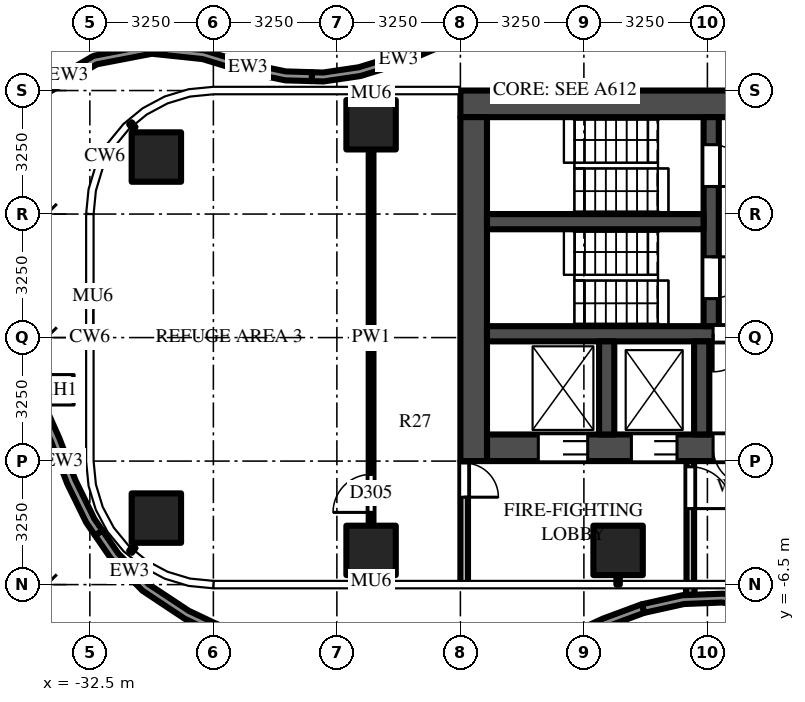
"""IFC4 building model, lengths in metres.
Left out: names, types, materials, properties, quantities, classifications, styles, units other than length and angle.
Written with IfcOpenShell. Run it as: python <this file> out.ifc"""

import sys

from ifc_helpers import new_model, si_unit, direction, frame, frame_2d, origin, origin_2d, place, context, subcontext, project, spatial, polyline, rectangle, outline, extrude, source, transform, mapped, element, fill, save


model = new_model("IFC4")
c1 = context("Model", 3, precision=1e-05, world=origin(), true_north=direction((0.0, 1.0)))
c2 = subcontext(c1, "Body", "Model", "MODEL_VIEW")
j1 = project(units=[si_unit("LENGTHUNIT", "METRE"), si_unit("PLANEANGLEUNIT", "RADIAN")], contexts=[c1])
p1 = place(None, origin())
s1 = spatial("IfcSite", under=j1, at=p1, CompositionType="ELEMENT")
p2 = place(p1, origin())
s2 = spatial("IfcBuilding", under=s1, at=p2, CompositionType="ELEMENT")
p3 = place(p2, frame((0.0, 0.0, 92.5)))
s3 = spatial("IfcBuildingStorey", under=s2, at=p3, CompositionType="ELEMENT", Elevation=92.5)
m1 = source(origin(), c2, "Body", "SweptSolid", [
    extrude(rectangle(XDim=1.3, YDim=1.3, at=origin_2d()), origin(), (0.0, 0.0, 1.0), 5.0),
])
for number, where, z_axis, x_axis in (
    (1, (-18.6, -5.6, 0.0), (0.0, 0.0, 1.0), (1.0, 0.0, 0.0)),
    (2, (-25.1, -5.6, 0.0), (0.0, 0.0, 1.0), (1.0, 0.0, 0.0)),
    (3, (-30.75, -4.75, 0.0), (0.0, 0.0, 1.0), (1.0, 0.0, 0.0)),
    (4, (-25.1, 5.6, 0.0), (0.0, 0.0, 1.0), (1.0, 0.0, 0.0)),
    (5, (-30.75, 4.75, 0.0), (0.0, 0.0, 1.0), (1.0, 0.0, 0.0)),
):
    element("IfcColumn", number, at=place(p3, frame(where, z_axis=z_axis, x_axis=x_axis)), inside=s3, PredefinedType="COLUMN", context=c2, shape_type="MappedRepresentation", body=[
        mapped(m1, transform((0.0, 0.0, 0.0))),
    ])
m2 = source(origin(), c2, "Body", "SweptSolid", [
    extrude(rectangle(XDim=16.5, YDim=0.7, at=frame_2d((8.25, 0.0))), origin(), (0.0, 0.0, 1.0), 4.75),
])
p4 = place(p3, frame((-6.25, 6.15, 0.0), z_axis=(0.0, 0.0, 1.0), x_axis=(-1.0, 0.0, 0.0)))
e6 = element("IfcWall", 6, at=p4, inside=s3, PredefinedType="SHEAR", context=c2, shape_type="MappedRepresentation", body=[
    mapped(m2, transform((0.0, 0.0, 0.0))),
])
m3 = source(origin(), c2, "Body", "SweptSolid", [
    extrude(rectangle(XDim=14.85, YDim=0.7, at=frame_2d((7.425, 0.0))), origin(), (0.0, 0.0, 1.0), 4.75),
])
p5 = place(p3, frame((-7.2, -2.9, 0.0), z_axis=(0.0, 0.0, 1.0), x_axis=(-1.0, 0.0, 0.0)))
e7 = element("IfcWall", 7, at=p5, inside=s3, PredefinedType="SHEAR", context=c2, shape_type="MappedRepresentation", body=[
    mapped(m3, transform((0.0, 0.0, 0.0))),
])
m4 = source(origin(), c2, "Body", "SweptSolid", [
    extrude(rectangle(XDim=1.3, YDim=2.1, at=frame_2d((0.65, 1.05))), frame((0.0, 0.36, 0.0), z_axis=(0.0, -1.0, 0.0), x_axis=(1.0, 0.0, 0.0)), (0.0, 0.0, 1.0), 0.72),
])
p6 = place(p5, frame((12.2, 0.0, 0.0)))
e8 = element("IfcOpeningElement", 8, at=p6, cuts=e7, PredefinedType="OPENING", context=c2, shape_type="MappedRepresentation", body=[
    mapped(m4, transform((0.0, 0.0, 0.0))),
])
m5 = source(origin(), c2, "Body", "SweptSolid", [
    extrude(rectangle(XDim=1.2, YDim=2.1, at=frame_2d((0.6, 1.05))), frame((0.0, 0.36, 0.0), z_axis=(0.0, -1.0, 0.0), x_axis=(1.0, 0.0, 0.0)), (0.0, 0.0, 1.0), 0.72),
])
p7 = place(p5, frame((9.85, 0.0, 0.0)))
e9 = element("IfcOpeningElement", 9, at=p7, cuts=e7, PredefinedType="OPENING", context=c2, shape_type="MappedRepresentation", body=[
    mapped(m5, transform((0.0, 0.0, 0.0))),
])
m6 = source(origin(), c2, "Body", "SweptSolid", [
    extrude(rectangle(XDim=1.0, YDim=2.1, at=frame_2d((0.5, 1.05))), frame((0.0, 0.36, 0.0), z_axis=(0.0, -1.0, 0.0), x_axis=(1.0, 0.0, 0.0)), (0.0, 0.0, 1.0), 0.72),
])
p8 = place(p5, frame((7.9, 0.0, 0.0)))
e10 = element("IfcOpeningElement", 10, at=p8, cuts=e7, PredefinedType="OPENING", context=c2, shape_type="MappedRepresentation", body=[
    mapped(m6, transform((0.0, 0.0, 0.0))),
])
m7 = source(origin(), c2, "Body", "SweptSolid", [
    extrude(rectangle(XDim=0.8, YDim=2.1, at=frame_2d((0.4, 1.05))), frame((0.0, 0.36, 0.0), z_axis=(0.0, -1.0, 0.0), x_axis=(1.0, 0.0, 0.0)), (0.0, 0.0, 1.0), 0.72),
])
p9 = place(p5, frame((0.113, 0.0, 0.0)))
e11 = element("IfcOpeningElement", 11, at=p9, cuts=e7, PredefinedType="OPENING", context=c2, shape_type="MappedRepresentation", body=[
    mapped(m7, transform((0.0, 0.0, 0.0))),
])
p10 = place(p5, frame((1.288, 0.0, 0.0)))
e12 = element("IfcOpeningElement", 12, at=p10, cuts=e7, PredefinedType="OPENING", context=c2, shape_type="MappedRepresentation", body=[
    mapped(m7, transform((0.0, 0.0, 0.0))),
])
p11 = place(p5, frame((2.712, 0.0, 0.0)))
e13 = element("IfcOpeningElement", 13, at=p11, cuts=e7, PredefinedType="OPENING", context=c2, shape_type="MappedRepresentation", body=[
    mapped(m7, transform((0.0, 0.0, 0.0))),
])
p12 = place(p5, frame((3.887, 0.0, 0.0)))
e14 = element("IfcOpeningElement", 14, at=p12, cuts=e7, PredefinedType="OPENING", context=c2, shape_type="MappedRepresentation", body=[
    mapped(m7, transform((0.0, 0.0, 0.0))),
])
p13 = place(p5, frame((5.312, 0.0, 0.0)))
e15 = element("IfcOpeningElement", 15, at=p13, cuts=e7, PredefinedType="OPENING", context=c2, shape_type="MappedRepresentation", body=[
    mapped(m7, transform((0.0, 0.0, 0.0))),
])
p14 = place(p5, frame((6.488, 0.0, 0.0)))
e16 = element("IfcOpeningElement", 16, at=p14, cuts=e7, PredefinedType="OPENING", context=c2, shape_type="MappedRepresentation", body=[
    mapped(m7, transform((0.0, 0.0, 0.0))),
])
m8 = source(origin(), c2, "Body", "SweptSolid", [
    extrude(rectangle(XDim=9.05, YDim=0.7, at=frame_2d((4.525, 0.0))), origin(), (0.0, 0.0, 1.0), 4.75),
])
p15 = place(p3, frame((-22.4, 5.8, 0.0), z_axis=(0.0, 0.0, 1.0), x_axis=(0.0, -1.0, 0.0)))
e17 = element("IfcWall", 17, at=p15, inside=s3, PredefinedType="SHEAR", context=c2, shape_type="MappedRepresentation", body=[
    mapped(m8, transform((0.0, 0.0, 0.0))),
])
m9 = source(origin(), c2, "Body", "SweptSolid", [
    extrude(rectangle(XDim=14.85, YDim=0.4, at=frame_2d((7.425, 0.0))), origin(), (0.0, 0.0, 1.0), 4.75),
])
p16 = place(p3, frame((-7.2, 0.1, 0.0), z_axis=(0.0, 0.0, 1.0), x_axis=(-1.0, 0.0, 0.0)))
e18 = element("IfcWall", 18, at=p16, inside=s3, PredefinedType="SHEAR", context=c2, shape_type="MappedRepresentation", body=[
    mapped(m9, transform((0.0, 0.0, 0.0))),
])
m10 = source(origin(), c2, "Body", "SweptSolid", [
    extrude(rectangle(XDim=1.0, YDim=2.1, at=frame_2d((0.5, 1.05))), frame((0.0, 0.21, 0.0), z_axis=(0.0, -1.0, 0.0), x_axis=(1.0, 0.0, 0.0)), (0.0, 0.0, 1.0), 0.42),
])
p17 = place(p16, frame((7.9, 0.0, 0.0)))
e19 = element("IfcOpeningElement", 19, at=p17, cuts=e18, PredefinedType="OPENING", context=c2, shape_type="MappedRepresentation", body=[
    mapped(m10, transform((0.0, 0.0, 0.0))),
])
m11 = source(origin(), c2, "Body", "SweptSolid", [
    extrude(rectangle(XDim=5.5, YDim=0.4, at=frame_2d((2.75, 0.0))), origin(), (0.0, 0.0, 1.0), 4.75),
])
p18 = place(p3, frame((-16.15, 5.8, 0.0), z_axis=(0.0, 0.0, 1.0), x_axis=(0.0, -1.0, 0.0)))
e20 = element("IfcWall", 20, at=p18, inside=s3, PredefinedType="SHEAR", context=c2, shape_type="MappedRepresentation", body=[
    mapped(m11, transform((0.0, 0.0, 0.0))),
])
m12 = source(origin(), c2, "Body", "SweptSolid", [
    extrude(rectangle(XDim=1.1, YDim=2.1, at=frame_2d((0.55, 1.05))), frame((0.0, 0.21, 0.0), z_axis=(0.0, -1.0, 0.0), x_axis=(1.0, 0.0, 0.0)), (0.0, 0.0, 1.0), 0.42),
])
p19 = place(p18, frame((0.725, 0.0, 0.0)))
e21 = element("IfcOpeningElement", 21, at=p19, cuts=e20, PredefinedType="OPENING", context=c2, shape_type="MappedRepresentation", body=[
    mapped(m12, transform((0.0, 0.0, 0.0))),
])
p20 = place(p18, frame((3.675, 0.0, 0.0)))
e22 = element("IfcOpeningElement", 22, at=p20, cuts=e20, PredefinedType="OPENING", context=c2, shape_type="MappedRepresentation", body=[
    mapped(m12, transform((0.0, 0.0, 0.0))),
])
m13 = source(origin(), c2, "Body", "SweptSolid", [
    extrude(rectangle(XDim=5.7, YDim=0.4, at=frame_2d((2.85, 0.0))), origin(), (0.0, 0.0, 1.0), 4.75),
])
p21 = place(p3, frame((-16.35, 3.05, 0.0), z_axis=(0.0, 0.0, 1.0), x_axis=(-1.0, 0.0, 0.0)))
e23 = element("IfcWall", 23, at=p21, inside=s3, PredefinedType="SHEAR", context=c2, shape_type="MappedRepresentation", body=[
    mapped(m13, transform((0.0, 0.0, 0.0))),
])
m14 = source(origin(), c2, "Body", "SweptSolid", [
    extrude(rectangle(XDim=2.45, YDim=0.4, at=frame_2d((1.225, 0.0))), origin(), (0.0, 0.0, 1.0), 4.75),
])
for number, where, z_axis, x_axis in (
    (24, (-16.4, -0.1, 0.0), (0.0, 0.0, 1.0), (0.0, -1.0, 0.0)),
    (25, (-18.9, -0.1, 0.0), (0.0, 0.0, 1.0), (0.0, -1.0, 0.0)),
):
    element("IfcWall", number, at=place(p3, frame(where, z_axis=z_axis, x_axis=x_axis)), inside=s3, PredefinedType="SHEAR", context=c2, shape_type="MappedRepresentation", body=[
        mapped(m14, transform((0.0, 0.0, 0.0))),
    ])
m15 = source(origin(), c2, "Body", "SweptSolid", [
    extrude(rectangle(XDim=3.25, YDim=0.2, at=frame_2d((1.625, 0.0))), origin(), (0.0, 0.0, 1.0), 4.75),
])
p22 = place(p3, frame((-16.7, -3.25, 0.0), z_axis=(0.0, 0.0, 1.0), x_axis=(0.0, -1.0, 0.0)))
e26 = element("IfcWall", 26, at=p22, inside=s3, PredefinedType="PARTITIONING", context=c2, shape_type="MappedRepresentation", body=[
    mapped(m15, transform((0.0, 0.0, 0.0))),
])
m16 = source(origin(), c2, "Body", "SweptSolid", [
    extrude(rectangle(XDim=1.1, YDim=2.1, at=frame_2d((0.55, 1.05))), frame((0.0, 0.11, 0.0), z_axis=(0.0, -1.0, 0.0), x_axis=(1.0, 0.0, 0.0)), (0.0, 0.0, 1.0), 0.22),
])
p23 = place(p22, frame((0.15, 0.0, 0.0)))
e27 = element("IfcOpeningElement", 27, at=p23, cuts=e26, PredefinedType="OPENING", context=c2, shape_type="MappedRepresentation", body=[
    mapped(m16, transform((0.0, 0.0, 0.0))),
])
p24 = place(p3, frame((-22.65, -3.25, 0.0), z_axis=(0.0, 0.0, 1.0), x_axis=(0.0, -1.0, 0.0)))
e28 = element("IfcWall", 28, at=p24, inside=s3, PredefinedType="PARTITIONING", context=c2, shape_type="MappedRepresentation", body=[
    mapped(m15, transform((0.0, 0.0, 0.0))),
])
m17 = source(origin(), c2, "Body", "SweptSolid", [
    extrude(rectangle(XDim=0.9, YDim=2.1, at=frame_2d((0.45, 1.05))), frame((0.0, 0.11, 0.0), z_axis=(0.0, -1.0, 0.0), x_axis=(1.0, 0.0, 0.0)), (0.0, 0.0, 1.0), 0.22),
])
p25 = place(p24, frame((0.05, 0.0, 0.0)))
e29 = element("IfcOpeningElement", 29, at=p25, cuts=e28, PredefinedType="OPENING", context=c2, shape_type="MappedRepresentation", body=[
    mapped(m17, transform((0.0, 0.0, 0.0))),
])
p26 = place(p3, frame((-16.7, -6.5, 0.0), z_axis=(0.0, 0.0, 1.0), x_axis=(0.0, -1.0, 0.0)))
e30 = element("IfcWall", 30, at=p26, inside=s3, PredefinedType="PARAPET", context=c2, shape_type="SweptSolid", body=[
    extrude(rectangle(XDim=0.268, YDim=0.225, at=frame_2d((0.134, 0.0))), origin(), (0.0, 0.0, 1.0), 1.1),
])
p27 = place(p3, origin())
e31 = element("IfcWall", 31, at=p27, inside=s3, PredefinedType="PARAPET", context=c2, shape_type="SweptSolid", body=[
    extrude(outline(polyline([(-31.117, -6.659), (-31.945, -5.814), (-32.363, -5.207), (-32.17, -5.073), (-31.753, -5.677), (-30.952, -6.49), (-29.898, -7.188), (-29.144, -7.545), (-29.244, -7.758), (-30.006, -7.397), (-31.117, -6.659)])), origin(), (0.0, 0.0, 1.0), 1.1),
])
e32 = element("IfcWall", 32, at=p27, inside=s3, PredefinedType="PARAPET", context=c2, shape_type="SweptSolid", body=[
    extrude(outline(polyline([(-32.363, -5.207), (-32.593, -4.873), (-33.094, -3.848), (-33.517, -2.745), (-33.953, -1.765), (-34.044, -1.576), (-33.833, -1.474), (-33.739, -1.667), (-33.301, -2.652), (-32.881, -3.75), (-32.383, -4.766), (-32.17, -5.073), (-32.363, -5.207)])), origin(), (0.0, 0.0, 1.0), 1.1),
])
e33 = element("IfcWall", 33, at=p27, inside=s3, PredefinedType="PARAPET", context=c2, shape_type="SweptSolid", body=[
    extrude(outline(polyline([(-34.236, 6.059), (-33.882, 6.53), (-33.808, 6.596), (-32.427, 7.4), (-32.378, 7.418), (-30.907, 7.702), (-30.862, 7.704), (-30.53, 7.669), (-30.554, 7.435), (-30.869, 7.468), (-32.314, 7.191), (-33.697, 6.384), (-34.049, 5.917), (-34.236, 6.059)])), origin(), (0.0, 0.0, 1.0), 1.1),
])
e34 = element("IfcWall", 34, at=p27, inside=s3, PredefinedType="PARAPET", context=c2, shape_type="SweptSolid", body=[
    extrude(outline(polyline([(-30.53, 7.669), (-29.502, 7.561), (-28.363, 7.215), (-27.342, 7.003), (-26.653, 6.983), (-26.66, 6.748), (-27.359, 6.768), (-28.426, 6.989), (-29.538, 7.329), (-30.554, 7.435), (-30.53, 7.669)])), origin(), (0.0, 0.0, 1.0), 1.1),
])
e35 = element("IfcWall", 35, at=p27, inside=s3, PredefinedType="PARAPET", context=c2, shape_type="SweptSolid", body=[
    extrude(outline(polyline([(-26.653, 6.983), (-26.358, 6.974), (-25.421, 7.113), (-24.373, 7.437), (-23.388, 7.859), (-22.979, 8.052), (-22.878, 7.839), (-23.29, 7.646), (-24.286, 7.219), (-25.377, 6.882), (-26.355, 6.739), (-26.66, 6.748), (-26.653, 6.983)])), origin(), (0.0, 0.0, 1.0), 1.1),
])
e36 = element("IfcWall", 36, at=p27, inside=s3, PredefinedType="PARAPET", context=c2, shape_type="SweptSolid", body=[
    extrude(outline(polyline([(-14.135, -7.339), (-14.879, -7.113), (-15.87, -6.971), (-16.866, -7.011), (-17.913, -7.243), (-17.918, -7.245), (-17.969, -7.016), (-16.907, -6.779), (-15.834, -6.738), (-14.837, -6.882), (-14.067, -7.114), (-14.135, -7.339)])), origin(), (0.0, 0.0, 1.0), 1.1),
])
e37 = element("IfcWall", 37, at=p27, inside=s3, PredefinedType="PARAPET", context=c2, shape_type="SweptSolid", body=[
    extrude(outline(polyline([(-17.918, -7.245), (-18.897, -7.607), (-19.883, -8.06), (-20.87, -8.535), (-21.517, -8.815), (-21.61, -8.599), (-20.97, -8.323), (-19.984, -7.847), (-18.991, -7.392), (-17.987, -7.02), (-17.969, -7.016), (-17.918, -7.245)])), origin(), (0.0, 0.0, 1.0), 1.1),
])
m18 = source(origin(), c2, "Body", "SweptSolid", [
    extrude(rectangle(XDim=9.9, YDim=0.125, at=frame_2d((4.95, 0.0))), origin(), (0.0, 0.0, 1.0), 3.968),
])
p28 = place(p3, frame((-25.1, -4.95, 0.0), z_axis=(0.0, 0.0, 1.0), x_axis=(0.0, 1.0, 0.0)))
e38 = element("IfcWall", 38, at=p28, inside=s3, PredefinedType="PARTITIONING", context=c2, shape_type="MappedRepresentation", body=[
    mapped(m18, transform((0.0, 0.0, 0.0))),
])
m19 = source(origin(), c2, "Body", "SweptSolid", [
    extrude(rectangle(XDim=1.0, YDim=2.1, at=frame_2d((0.5, 1.05))), frame((0.0, 0.073, 0.0), z_axis=(0.0, -1.0, 0.0), x_axis=(1.0, 0.0, 0.0)), (0.0, 0.0, 1.0), 0.145),
])
p29 = place(p28, frame((0.35, 0.0, 0.0)))
e39 = element("IfcOpeningElement", 39, at=p29, cuts=e38, PredefinedType="OPENING", context=c2, shape_type="MappedRepresentation", body=[
    mapped(m19, transform((0.0, 0.0, 0.0))),
])
m20 = source(origin(), c2, "Body", "SweptSolid", [
    extrude(rectangle(XDim=1.3, YDim=2.1, at=frame_2d((0.65, 1.05))), frame((0.0, -0.275, 0.0), z_axis=(0.0, -1.0, 0.0), x_axis=(1.0, 0.0, 0.0)), (0.0, 0.0, 1.0), 0.05),
])
p30 = place(p6, origin())
e40 = element("IfcDoor", 40, at=p30, inside=s3, OperationType="DOUBLE_DOOR_SLIDING", PredefinedType="DOOR", context=c2, shape_type="MappedRepresentation", body=[
    mapped(m20, transform((0.0, 0.0, 0.0))),
])
fill(e8, e40)
m21 = source(origin(), c2, "Body", "SweptSolid", [
    extrude(rectangle(XDim=1.2, YDim=2.1, at=frame_2d((0.6, 1.05))), frame((0.0, -0.275, 0.0), z_axis=(0.0, -1.0, 0.0), x_axis=(1.0, 0.0, 0.0)), (0.0, 0.0, 1.0), 0.05),
])
p31 = place(p7, origin())
e41 = element("IfcDoor", 41, at=p31, inside=s3, OperationType="DOUBLE_DOOR_SLIDING", PredefinedType="DOOR", context=c2, shape_type="MappedRepresentation", body=[
    mapped(m21, transform((0.0, 0.0, 0.0))),
])
fill(e9, e41)
m22 = source(origin(), c2, "Body", "SweptSolid", [
    extrude(rectangle(XDim=1.1, YDim=2.1, at=frame_2d((0.55, 1.05))), frame((0.0, 0.025, 0.0), z_axis=(0.0, -1.0, 0.0), x_axis=(1.0, 0.0, 0.0)), (0.0, 0.0, 1.0), 0.05),
])
p32 = place(p19, origin())
e42 = element("IfcDoor", 42, at=p32, inside=s3, OperationType="SINGLE_SWING_RIGHT", PredefinedType="DOOR", context=c2, shape_type="MappedRepresentation", body=[
    mapped(m22, transform((0.0, 0.0, 0.0))),
])
fill(e21, e42)
p33 = place(p20, origin())
e43 = element("IfcDoor", 43, at=p33, inside=s3, OperationType="SINGLE_SWING_LEFT", PredefinedType="DOOR", context=c2, shape_type="MappedRepresentation", body=[
    mapped(m22, transform((0.0, 0.0, 0.0))),
])
fill(e22, e43)
m23 = source(origin(), c2, "Body", "SweptSolid", [
    extrude(rectangle(XDim=1.0, YDim=2.1, at=frame_2d((0.5, 1.05))), frame((0.0, 0.025, 0.0), z_axis=(0.0, -1.0, 0.0), x_axis=(1.0, 0.0, 0.0)), (0.0, 0.0, 1.0), 0.05),
])
p34 = place(p17, origin())
e44 = element("IfcDoor", 44, at=p34, inside=s3, OperationType="SINGLE_SWING_RIGHT", PredefinedType="DOOR", context=c2, shape_type="MappedRepresentation", body=[
    mapped(m23, transform((0.0, 0.0, 0.0))),
])
fill(e19, e44)
m24 = source(origin(), c2, "Body", "SweptSolid", [
    extrude(rectangle(XDim=1.0, YDim=2.1, at=frame_2d((0.5, 1.05))), frame((0.0, -0.275, 0.0), z_axis=(0.0, -1.0, 0.0), x_axis=(1.0, 0.0, 0.0)), (0.0, 0.0, 1.0), 0.05),
])
p35 = place(p8, origin())
e45 = element("IfcDoor", 45, at=p35, inside=s3, OperationType="SINGLE_SWING_LEFT", PredefinedType="DOOR", context=c2, shape_type="MappedRepresentation", body=[
    mapped(m24, transform((0.0, 0.0, 0.0))),
])
fill(e10, e45)
p36 = place(p23, origin())
e46 = element("IfcDoor", 46, at=p36, inside=s3, OperationType="SINGLE_SWING_RIGHT", PredefinedType="DOOR", context=c2, shape_type="MappedRepresentation", body=[
    mapped(m22, transform((0.0, 0.0, 0.0))),
])
fill(e27, e46)
m25 = source(origin(), c2, "Body", "SweptSolid", [
    extrude(rectangle(XDim=0.9, YDim=2.1, at=frame_2d((0.45, 1.05))), frame((0.0, 0.025, 0.0), z_axis=(0.0, -1.0, 0.0), x_axis=(1.0, 0.0, 0.0)), (0.0, 0.0, 1.0), 0.05),
])
p37 = place(p25, origin())
e47 = element("IfcDoor", 47, at=p37, inside=s3, OperationType="SINGLE_SWING_RIGHT", PredefinedType="DOOR", context=c2, shape_type="MappedRepresentation", body=[
    mapped(m25, transform((0.0, 0.0, 0.0))),
])
fill(e29, e47)
p38 = place(p3, frame((0.0, 0.0, -0.15)))
p39 = place(p38, frame((-33.315, -1.374, 0.0)))
p40 = place(p39, frame((0.0, 0.0, 0.1)))
e48 = element("IfcDoor", 48, at=p40, inside=s3, OperationType="SINGLE_SWING_LEFT", PredefinedType="TRAPDOOR", context=c2, shape_type="SweptSolid", body=[
    extrude(rectangle(XDim=0.8, YDim=0.8, at=origin_2d()), origin(), (0.0, 0.0, 1.0), 0.05),
])
p41 = place(p29, origin())
e49 = element("IfcDoor", 49, at=p41, inside=s3, OperationType="SINGLE_SWING_LEFT", PredefinedType="DOOR", context=c2, shape_type="MappedRepresentation", body=[
    mapped(m23, transform((0.0, 0.0, 0.0))),
])
fill(e39, e49)
save(model, sys.argv[1])
